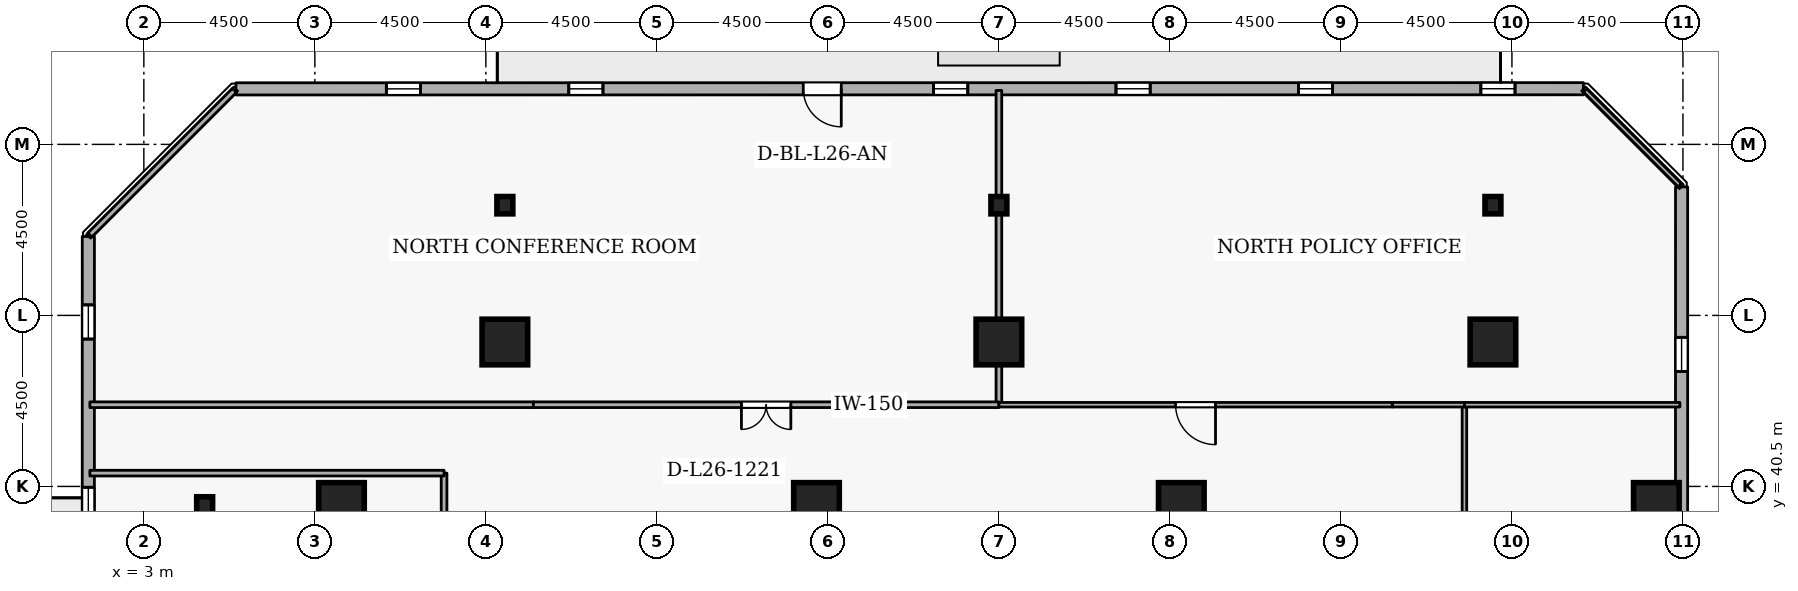
"""IFC4 building model, lengths in metres.
Left out: names, types, materials, properties, quantities, classifications, styles, units other than length and angle.
Written with IfcOpenShell. Run it as: python <this file> out.ifc"""

import sys

from ifc_helpers import new_model, si_unit, direction, frame, frame_2d, origin, origin_2d, place, context, subcontext, project, spatial, rectangle, i_section, extrude, element, fill, save


model = new_model("IFC4")
c1 = context("Model", 3, precision=1e-05, world=origin(), true_north=direction((0.0, 1.0)))
c2 = subcontext(c1, "Body", "Model", "MODEL_VIEW")
j1 = project(units=[si_unit("LENGTHUNIT", "METRE"), si_unit("PLANEANGLEUNIT", "RADIAN")], contexts=[c1])
p1 = place(None, origin())
s1 = spatial("IfcSite", under=j1, at=p1, CompositionType="ELEMENT")
p2 = place(p1, origin())
s2 = spatial("IfcBuilding", under=s1, at=p2, CompositionType="ELEMENT")
p3 = place(p2, frame((0.0, 0.0, 101.7)))
s3 = spatial("IfcBuildingStorey", under=s2, at=p3, CompositionType="ELEMENT", Elevation=101.7)
for number, where, z_axis, x_axis in (
    (1, (42.8, 40.0, 0.0), (0.0, 0.0, 1.0), (1.0, 0.0, 0.0)),
    (2, (12.5, 44.3, 0.0), (0.0, 0.0, 1.0), (1.0, 0.0, 0.0)),
    (3, (25.5, 44.3, 0.0), (0.0, 0.0, 1.0), (1.0, 0.0, 0.0)),
    (4, (38.5, 44.3, 0.0), (0.0, 0.0, 1.0), (1.0, 0.0, 0.0)),
    (5, (8.2, 40.0, 0.0), (0.0, 0.0, 1.0), (1.0, 0.0, 0.0)),
    (6, (20.7, 40.0, 0.0), (0.0, 0.0, 1.0), (1.0, 0.0, 0.0)),
    (7, (30.3, 40.0, 0.0), (0.0, 0.0, 1.0), (1.0, 0.0, 0.0)),
):
    element("IfcColumn", number, at=place(p3, frame(where, z_axis=z_axis, x_axis=x_axis)), inside=s3, PredefinedType="COLUMN", context=c2, shape_type="SweptSolid", body=[
        extrude(rectangle(XDim=1.2, YDim=1.2, at=origin_2d()), origin(), (0.0, 0.0, 1.0), 3.6),
    ])
for number, where, z_axis, x_axis in (
    (8, (12.5, 47.9, 0.0), (0.0, 0.0, 1.0), (1.0, 0.0, 0.0)),
    (9, (25.5, 47.9, 0.0), (0.0, 0.0, 1.0), (1.0, 0.0, 0.0)),
    (10, (38.5, 47.9, 0.0), (0.0, 0.0, 1.0), (1.0, 0.0, 0.0)),
    (11, (4.6, 40.0, 0.0), (0.0, 0.0, 1.0), (1.0, 0.0, 0.0)),
):
    element("IfcColumn", number, at=place(p3, frame(where, z_axis=z_axis, x_axis=x_axis)), inside=s3, PredefinedType="COLUMN", context=c2, shape_type="SweptSolid", body=[
        extrude(i_section(OverallWidth=0.418, OverallDepth=0.456, WebThickness=0.042, FlangeThickness=0.067, FilletRadius=0.015, at=origin_2d()), origin(), (0.0, 0.0, 1.0), 3.6),
    ])
p4 = place(p3, frame((43.46, 12.923, 0.0), z_axis=(0.0, 0.0, 1.0), x_axis=(0.00011704845, 0.99999999315, 0.0)))
e12 = element("IfcWall", 12, at=p4, inside=s3, PredefinedType="STANDARD", context=c2, shape_type="SweptSolid", body=[
    extrude(rectangle(XDim=35.459, YDim=0.32, at=frame_2d((17.729, 0.0))), origin(), (0.0, 0.0, 1.0), 2.7),
])
p5 = place(p4, frame((6.6, 0.0, 0.72)))
e13 = element("IfcOpeningElement", 13, at=p5, cuts=e12, PredefinedType="OPENING", context=c2, shape_type="SweptSolid", body=[
    extrude(rectangle(XDim=0.9, YDim=1.75, at=frame_2d((0.45, 0.875))), frame((0.0, 0.17, 0.0), z_axis=(0.0, -1.0, 0.0), x_axis=(1.0, 0.0, 0.0)), (0.0, 0.0, 1.0), 0.34),
])
p6 = place(p4, frame((11.4, 0.0, 0.72)))
e14 = element("IfcOpeningElement", 14, at=p6, cuts=e12, PredefinedType="OPENING", context=c2, shape_type="SweptSolid", body=[
    extrude(rectangle(XDim=0.9, YDim=1.75, at=frame_2d((0.45, 0.875))), frame((0.0, 0.17, 0.0), z_axis=(0.0, -1.0, 0.0), x_axis=(1.0, 0.0, 0.0)), (0.0, 0.0, 1.0), 0.34),
])
p7 = place(p4, frame((16.2, 0.0, 0.72)))
e15 = element("IfcOpeningElement", 15, at=p7, cuts=e12, PredefinedType="OPENING", context=c2, shape_type="SweptSolid", body=[
    extrude(rectangle(XDim=0.9, YDim=1.75, at=frame_2d((0.45, 0.875))), frame((0.0, 0.17, 0.0), z_axis=(0.0, -1.0, 0.0), x_axis=(1.0, 0.0, 0.0)), (0.0, 0.0, 1.0), 0.34),
])
p8 = place(p4, frame((21.0, 0.0, 0.72)))
e16 = element("IfcOpeningElement", 16, at=p8, cuts=e12, PredefinedType="OPENING", context=c2, shape_type="SweptSolid", body=[
    extrude(rectangle(XDim=0.9, YDim=1.75, at=frame_2d((0.45, 0.875))), frame((0.0, 0.17, 0.0), z_axis=(0.0, -1.0, 0.0), x_axis=(1.0, 0.0, 0.0)), (0.0, 0.0, 1.0), 0.34),
])
p9 = place(p4, frame((30.6, 0.0, 0.72)))
e17 = element("IfcOpeningElement", 17, at=p9, cuts=e12, PredefinedType="OPENING", context=c2, shape_type="SweptSolid", body=[
    extrude(rectangle(XDim=0.9, YDim=1.75, at=frame_2d((0.45, 0.875))), frame((0.0, 0.17, 0.0), z_axis=(0.0, -1.0, 0.0), x_axis=(1.0, 0.0, 0.0)), (0.0, 0.0, 1.0), 0.34),
])
p10 = place(p3, frame((40.881, 50.965, 0.0), z_axis=(0.0, 0.0, 1.0), x_axis=(-0.99999999315, -0.00011704845, 0.0)))
e18 = element("IfcWall", 18, at=p10, inside=s3, PredefinedType="STANDARD", context=c2, shape_type="SweptSolid", body=[
    extrude(rectangle(XDim=35.459, YDim=0.32, at=frame_2d((17.729, 0.0))), origin(), (0.0, 0.0, 1.0), 2.7),
])
p11 = place(p10, frame((19.529, 0.0, 0.0)))
e19 = element("IfcOpeningElement", 19, at=p11, cuts=e18, PredefinedType="OPENING", context=c2, shape_type="SweptSolid", body=[
    extrude(rectangle(XDim=1.0, YDim=2.08, at=frame_2d((0.5, 1.04))), frame((0.0, 0.17, 0.0), z_axis=(0.0, -1.0, 0.0), x_axis=(1.0, 0.0, 0.0)), (0.0, 0.0, 1.0), 0.34),
])
p12 = place(p10, frame((1.8, 0.0, 0.72)))
e20 = element("IfcOpeningElement", 20, at=p12, cuts=e18, PredefinedType="OPENING", context=c2, shape_type="SweptSolid", body=[
    extrude(rectangle(XDim=0.9, YDim=1.75, at=frame_2d((0.45, 0.875))), frame((0.0, 0.17, 0.0), z_axis=(0.0, -1.0, 0.0), x_axis=(1.0, 0.0, 0.0)), (0.0, 0.0, 1.0), 0.34),
])
p13 = place(p10, frame((6.6, 0.0, 0.72)))
e21 = element("IfcOpeningElement", 21, at=p13, cuts=e18, PredefinedType="OPENING", context=c2, shape_type="SweptSolid", body=[
    extrude(rectangle(XDim=0.9, YDim=1.75, at=frame_2d((0.45, 0.875))), frame((0.0, 0.17, 0.0), z_axis=(0.0, -1.0, 0.0), x_axis=(1.0, 0.0, 0.0)), (0.0, 0.0, 1.0), 0.34),
])
p14 = place(p10, frame((11.4, 0.0, 0.72)))
e22 = element("IfcOpeningElement", 22, at=p14, cuts=e18, PredefinedType="OPENING", context=c2, shape_type="SweptSolid", body=[
    extrude(rectangle(XDim=0.9, YDim=1.75, at=frame_2d((0.45, 0.875))), frame((0.0, 0.17, 0.0), z_axis=(0.0, -1.0, 0.0), x_axis=(1.0, 0.0, 0.0)), (0.0, 0.0, 1.0), 0.34),
])
p15 = place(p10, frame((16.2, 0.0, 0.72)))
e23 = element("IfcOpeningElement", 23, at=p15, cuts=e18, PredefinedType="OPENING", context=c2, shape_type="SweptSolid", body=[
    extrude(rectangle(XDim=0.9, YDim=1.75, at=frame_2d((0.45, 0.875))), frame((0.0, 0.17, 0.0), z_axis=(0.0, -1.0, 0.0), x_axis=(1.0, 0.0, 0.0)), (0.0, 0.0, 1.0), 0.34),
])
p16 = place(p10, frame((25.8, 0.0, 0.72)))
e24 = element("IfcOpeningElement", 24, at=p16, cuts=e18, PredefinedType="OPENING", context=c2, shape_type="SweptSolid", body=[
    extrude(rectangle(XDim=0.9, YDim=1.75, at=frame_2d((0.45, 0.875))), frame((0.0, 0.17, 0.0), z_axis=(0.0, -1.0, 0.0), x_axis=(1.0, 0.0, 0.0)), (0.0, 0.0, 1.0), 0.34),
])
p17 = place(p10, frame((30.6, 0.0, 0.72)))
e25 = element("IfcOpeningElement", 25, at=p17, cuts=e18, PredefinedType="OPENING", context=c2, shape_type="SweptSolid", body=[
    extrude(rectangle(XDim=0.9, YDim=1.75, at=frame_2d((0.45, 0.875))), frame((0.0, 0.17, 0.0), z_axis=(0.0, -1.0, 0.0), x_axis=(1.0, 0.0, 0.0)), (0.0, 0.0, 1.0), 0.34),
])
p18 = place(p3, frame((1.54, 47.077, 0.0), z_axis=(0.0, 0.0, 1.0), x_axis=(-0.00011704845, -0.99999999315, 0.0)))
e26 = element("IfcWall", 26, at=p18, inside=s3, PredefinedType="STANDARD", context=c2, shape_type="SweptSolid", body=[
    extrude(rectangle(XDim=35.459, YDim=0.32, at=frame_2d((17.729, 0.0))), origin(), (0.0, 0.0, 1.0), 2.7),
])
p19 = place(p18, frame((20.429, 0.0, 0.0)))
e27 = element("IfcOpeningElement", 27, at=p19, cuts=e26, PredefinedType="OPENING", context=c2, shape_type="SweptSolid", body=[
    extrude(rectangle(XDim=1.0, YDim=2.08, at=frame_2d((0.5, 1.04))), frame((0.0, 0.17, 0.0), z_axis=(0.0, -1.0, 0.0), x_axis=(1.0, 0.0, 0.0)), (0.0, 0.0, 1.0), 0.34),
])
p20 = place(p18, frame((1.8, 0.0, 0.72)))
e28 = element("IfcOpeningElement", 28, at=p20, cuts=e26, PredefinedType="OPENING", context=c2, shape_type="SweptSolid", body=[
    extrude(rectangle(XDim=0.9, YDim=1.75, at=frame_2d((0.45, 0.875))), frame((0.0, 0.17, 0.0), z_axis=(0.0, -1.0, 0.0), x_axis=(1.0, 0.0, 0.0)), (0.0, 0.0, 1.0), 0.34),
])
p21 = place(p18, frame((6.6, 0.0, 0.72)))
e29 = element("IfcOpeningElement", 29, at=p21, cuts=e26, PredefinedType="OPENING", context=c2, shape_type="SweptSolid", body=[
    extrude(rectangle(XDim=0.9, YDim=1.75, at=frame_2d((0.45, 0.875))), frame((0.0, 0.17, 0.0), z_axis=(0.0, -1.0, 0.0), x_axis=(1.0, 0.0, 0.0)), (0.0, 0.0, 1.0), 0.34),
])
p22 = place(p18, frame((11.4, 0.0, 0.72)))
e30 = element("IfcOpeningElement", 30, at=p22, cuts=e26, PredefinedType="OPENING", context=c2, shape_type="SweptSolid", body=[
    extrude(rectangle(XDim=0.9, YDim=1.75, at=frame_2d((0.45, 0.875))), frame((0.0, 0.17, 0.0), z_axis=(0.0, -1.0, 0.0), x_axis=(1.0, 0.0, 0.0)), (0.0, 0.0, 1.0), 0.34),
])
p23 = place(p18, frame((16.2, 0.0, 0.72)))
e31 = element("IfcOpeningElement", 31, at=p23, cuts=e26, PredefinedType="OPENING", context=c2, shape_type="SweptSolid", body=[
    extrude(rectangle(XDim=0.9, YDim=1.75, at=frame_2d((0.45, 0.875))), frame((0.0, 0.17, 0.0), z_axis=(0.0, -1.0, 0.0), x_axis=(1.0, 0.0, 0.0)), (0.0, 0.0, 1.0), 0.34),
])
p24 = place(p18, frame((25.8, 0.0, 0.72)))
e32 = element("IfcOpeningElement", 32, at=p24, cuts=e26, PredefinedType="OPENING", context=c2, shape_type="SweptSolid", body=[
    extrude(rectangle(XDim=0.9, YDim=1.75, at=frame_2d((0.45, 0.875))), frame((0.0, 0.17, 0.0), z_axis=(0.0, -1.0, 0.0), x_axis=(1.0, 0.0, 0.0)), (0.0, 0.0, 1.0), 0.34),
])
p25 = place(p18, frame((30.6, 0.0, 0.72)))
e33 = element("IfcOpeningElement", 33, at=p25, cuts=e26, PredefinedType="OPENING", context=c2, shape_type="SweptSolid", body=[
    extrude(rectangle(XDim=0.9, YDim=1.75, at=frame_2d((0.45, 0.875))), frame((0.0, 0.17, 0.0), z_axis=(0.0, -1.0, 0.0), x_axis=(1.0, 0.0, 0.0)), (0.0, 0.0, 1.0), 0.34),
])
p26 = place(p3, frame((10.9, 40.85, 0.0), z_axis=(0.0, 0.0, 1.0), x_axis=(0.0, -1.0, 0.0)))
e34 = element("IfcWall", 34, at=p26, inside=s3, PredefinedType="PARTITIONING", context=c2, shape_type="SweptSolid", body=[
    extrude(rectangle(XDim=4.912, YDim=0.15, at=frame_2d((2.456, 0.0))), origin(), (0.0, 0.0, 1.0), 3.34),
])
p27 = place(p3, frame((1.58, 40.85, 0.0), z_axis=(0.0, 0.0, 1.0), x_axis=(1.0, 0.0, 0.0)))
e35 = element("IfcWall", 35, at=p27, inside=s3, PredefinedType="PARTITIONING", context=c2, shape_type="SweptSolid", body=[
    extrude(rectangle(XDim=9.32, YDim=0.15, at=frame_2d((4.66, 0.0))), origin(), (0.0, 0.0, 1.0), 3.34),
])
p28 = place(p3, frame((37.75, 33.3, 0.0), z_axis=(0.0, 0.0, 1.0), x_axis=(0.0, 1.0, 0.0)))
e36 = element("IfcWall", 36, at=p28, inside=s3, PredefinedType="PARTITIONING", context=c2, shape_type="SweptSolid", body=[
    extrude(rectangle(XDim=9.35, YDim=0.12, at=frame_2d((4.675, 0.0))), origin(), (0.0, 0.0, 1.0), 3.34),
])
p29 = place(p28, frame((4.15, 0.0, 0.0)))
e37 = element("IfcOpeningElement", 37, at=p29, cuts=e36, PredefinedType="OPENING", context=c2, shape_type="SweptSolid", body=[
    extrude(rectangle(XDim=1.05, YDim=2.1, at=frame_2d((0.525, 1.05))), frame((0.0, 0.07, 0.0), z_axis=(0.0, -1.0, 0.0), x_axis=(1.0, 0.0, 0.0)), (0.0, 0.0, 1.0), 0.14),
])
p30 = place(p3, frame((37.75, 42.65, 0.0), z_axis=(0.0, 0.0, 1.0), x_axis=(1.0, 0.0, 0.0)))
e38 = element("IfcWall", 38, at=p30, inside=s3, PredefinedType="PARTITIONING", context=c2, shape_type="SweptSolid", body=[
    extrude(rectangle(XDim=5.67, YDim=0.12, at=frame_2d((2.835, 0.0))), origin(), (0.0, 0.0, 1.0), 3.34),
])
p31 = place(p3, frame((13.25, 42.65, 0.0), z_axis=(0.0, 0.0, 1.0), x_axis=(-1.0, 0.0, 0.0)))
e39 = element("IfcWall", 39, at=p31, inside=s3, PredefinedType="PARTITIONING", context=c2, shape_type="SweptSolid", body=[
    extrude(rectangle(XDim=11.67, YDim=0.15, at=frame_2d((5.835, 0.0))), origin(), (0.0, 0.0, 1.0), 3.34),
])
p32 = place(p3, frame((1.58, 47.116, 0.0), z_axis=(0.0, 0.0, 1.0), x_axis=(0.707106781187, 0.707106781187, 0.0)))
e40 = element("IfcWall", 40, at=p32, inside=s3, PredefinedType="PARTITIONING", context=c2, shape_type="SweptSolid", body=[
    extrude(rectangle(XDim=5.379, YDim=0.15, at=frame_2d((2.689, 0.0))), origin(), (0.0, 0.0, 1.0), 3.34),
])
p33 = place(p3, frame((25.5, 50.92, 0.0), z_axis=(0.0, 0.0, 1.0), x_axis=(0.0, -1.0, 0.0)))
e41 = element("IfcWall", 41, at=p33, inside=s3, PredefinedType="PARTITIONING", context=c2, shape_type="SweptSolid", body=[
    extrude(rectangle(XDim=8.27, YDim=0.15, at=frame_2d((4.135, 0.0))), origin(), (0.0, 0.0, 1.0), 2.878),
])
p34 = place(p3, frame((25.5, 42.65, 0.0), z_axis=(0.0, 0.0, 1.0), x_axis=(-1.0, 0.0, 0.0)))
e42 = element("IfcWall", 42, at=p34, inside=s3, PredefinedType="PARTITIONING", context=c2, shape_type="SweptSolid", body=[
    extrude(rectangle(XDim=12.25, YDim=0.15, at=frame_2d((6.125, 0.0))), origin(), (0.0, 0.0, 1.0), 3.34),
])
p35 = place(p34, frame((5.475, 0.0, 0.0)))
e43 = element("IfcOpeningElement", 43, at=p35, cuts=e42, PredefinedType="OPENING", context=c2, shape_type="SweptSolid", body=[
    extrude(rectangle(XDim=1.3, YDim=2.12, at=frame_2d((0.65, 1.06))), frame((0.0, 0.085, 0.0), z_axis=(0.0, -1.0, 0.0), x_axis=(1.0, 0.0, 0.0)), (0.0, 0.0, 1.0), 0.17),
])
p36 = place(p3, frame((37.75, 42.65, 0.0), z_axis=(0.0, 0.0, 1.0), x_axis=(-1.0, 0.0, 0.0)))
e44 = element("IfcWall", 44, at=p36, inside=s3, PredefinedType="PARTITIONING", context=c2, shape_type="SweptSolid", body=[
    extrude(rectangle(XDim=1.9, YDim=0.12, at=frame_2d((0.95, 0.0))), origin(), (0.0, 0.0, 1.0), 3.34),
])
p37 = place(p3, frame((35.85, 42.65, 0.0), z_axis=(0.0, 0.0, 1.0), x_axis=(-1.0, 0.0, 0.0)))
e45 = element("IfcWall", 45, at=p37, inside=s3, PredefinedType="PARTITIONING", context=c2, shape_type="SweptSolid", body=[
    extrude(rectangle(XDim=10.35, YDim=0.12, at=frame_2d((5.175, 0.0))), origin(), (0.0, 0.0, 1.0), 2.895),
])
p38 = place(p37, frame((4.65, 0.0, 0.0)))
e46 = element("IfcOpeningElement", 46, at=p38, cuts=e45, PredefinedType="OPENING", context=c2, shape_type="SweptSolid", body=[
    extrude(rectangle(XDim=1.05, YDim=2.1, at=frame_2d((0.525, 1.05))), frame((0.0, 0.07, 0.0), z_axis=(0.0, -1.0, 0.0), x_axis=(1.0, 0.0, 0.0)), (0.0, 0.0, 1.0), 0.14),
])
p39 = place(p3, frame((40.925, 50.92, 0.0), z_axis=(0.0, 0.0, 1.0), x_axis=(0.707106781187, -0.707106781187, 0.0)))
e47 = element("IfcWall", 47, at=p39, inside=s3, PredefinedType="PARTITIONING", context=c2, shape_type="SweptSolid", body=[
    extrude(rectangle(XDim=3.528, YDim=0.12, at=frame_2d((1.764, 0.0))), origin(), (0.0, 0.0, 1.0), 3.34),
])
p40 = place(p9, origin())
e48 = element("IfcWindow", 48, at=p40, inside=s3, PartitioningType="SINGLE_PANEL", PredefinedType="WINDOW", context=c2, shape_type="SweptSolid", body=[
    extrude(rectangle(XDim=0.9, YDim=1.75, at=frame_2d((0.45, 0.875))), frame((0.0, 0.03, 0.0), z_axis=(0.0, -1.0, 0.0), x_axis=(1.0, 0.0, 0.0)), (0.0, 0.0, 1.0), 0.06),
])
fill(e17, e48)
p41 = place(p11, origin())
e49 = element("IfcDoor", 49, at=p41, inside=s3, OperationType="SINGLE_SWING_LEFT", PredefinedType="DOOR", context=c2, shape_type="SweptSolid", body=[
    extrude(rectangle(XDim=1.0, YDim=2.08, at=frame_2d((0.5, 1.04))), frame((0.0, 0.025, 0.0), z_axis=(0.0, -1.0, 0.0), x_axis=(1.0, 0.0, 0.0)), (0.0, 0.0, 1.0), 0.05),
])
fill(e19, e49)
p42 = place(p12, origin())
e50 = element("IfcWindow", 50, at=p42, inside=s3, PartitioningType="SINGLE_PANEL", PredefinedType="WINDOW", context=c2, shape_type="SweptSolid", body=[
    extrude(rectangle(XDim=0.9, YDim=1.75, at=frame_2d((0.45, 0.875))), frame((0.0, 0.03, 0.0), z_axis=(0.0, -1.0, 0.0), x_axis=(1.0, 0.0, 0.0)), (0.0, 0.0, 1.0), 0.06),
])
fill(e20, e50)
p43 = place(p13, origin())
e51 = element("IfcWindow", 51, at=p43, inside=s3, PartitioningType="SINGLE_PANEL", PredefinedType="WINDOW", context=c2, shape_type="SweptSolid", body=[
    extrude(rectangle(XDim=0.9, YDim=1.75, at=frame_2d((0.45, 0.875))), frame((0.0, 0.03, 0.0), z_axis=(0.0, -1.0, 0.0), x_axis=(1.0, 0.0, 0.0)), (0.0, 0.0, 1.0), 0.06),
])
fill(e21, e51)
p44 = place(p14, origin())
e52 = element("IfcWindow", 52, at=p44, inside=s3, PartitioningType="SINGLE_PANEL", PredefinedType="WINDOW", context=c2, shape_type="SweptSolid", body=[
    extrude(rectangle(XDim=0.9, YDim=1.75, at=frame_2d((0.45, 0.875))), frame((0.0, 0.03, 0.0), z_axis=(0.0, -1.0, 0.0), x_axis=(1.0, 0.0, 0.0)), (0.0, 0.0, 1.0), 0.06),
])
fill(e22, e52)
p45 = place(p15, origin())
e53 = element("IfcWindow", 53, at=p45, inside=s3, PartitioningType="SINGLE_PANEL", PredefinedType="WINDOW", context=c2, shape_type="SweptSolid", body=[
    extrude(rectangle(XDim=0.9, YDim=1.75, at=frame_2d((0.45, 0.875))), frame((0.0, 0.03, 0.0), z_axis=(0.0, -1.0, 0.0), x_axis=(1.0, 0.0, 0.0)), (0.0, 0.0, 1.0), 0.06),
])
fill(e23, e53)
p46 = place(p16, origin())
e54 = element("IfcWindow", 54, at=p46, inside=s3, PartitioningType="SINGLE_PANEL", PredefinedType="WINDOW", context=c2, shape_type="SweptSolid", body=[
    extrude(rectangle(XDim=0.9, YDim=1.75, at=frame_2d((0.45, 0.875))), frame((0.0, 0.03, 0.0), z_axis=(0.0, -1.0, 0.0), x_axis=(1.0, 0.0, 0.0)), (0.0, 0.0, 1.0), 0.06),
])
fill(e24, e54)
p47 = place(p17, origin())
e55 = element("IfcWindow", 55, at=p47, inside=s3, PartitioningType="SINGLE_PANEL", PredefinedType="WINDOW", context=c2, shape_type="SweptSolid", body=[
    extrude(rectangle(XDim=0.9, YDim=1.75, at=frame_2d((0.45, 0.875))), frame((0.0, 0.03, 0.0), z_axis=(0.0, -1.0, 0.0), x_axis=(1.0, 0.0, 0.0)), (0.0, 0.0, 1.0), 0.06),
])
fill(e25, e55)
p48 = place(p20, origin())
e56 = element("IfcWindow", 56, at=p48, inside=s3, PartitioningType="SINGLE_PANEL", PredefinedType="WINDOW", context=c2, shape_type="SweptSolid", body=[
    extrude(rectangle(XDim=0.9, YDim=1.75, at=frame_2d((0.45, 0.875))), frame((0.0, 0.03, 0.0), z_axis=(0.0, -1.0, 0.0), x_axis=(1.0, 0.0, 0.0)), (0.0, 0.0, 1.0), 0.06),
])
fill(e28, e56)
p49 = place(p21, origin())
e57 = element("IfcWindow", 57, at=p49, inside=s3, PartitioningType="SINGLE_PANEL", PredefinedType="WINDOW", context=c2, shape_type="SweptSolid", body=[
    extrude(rectangle(XDim=0.9, YDim=1.75, at=frame_2d((0.45, 0.875))), frame((0.0, 0.03, 0.0), z_axis=(0.0, -1.0, 0.0), x_axis=(1.0, 0.0, 0.0)), (0.0, 0.0, 1.0), 0.06),
])
fill(e29, e57)
p50 = place(p35, origin())
e58 = element("IfcDoor", 58, at=p50, inside=s3, OperationType="DOUBLE_DOOR_SINGLE_SWING", PredefinedType="DOOR", context=c2, shape_type="SweptSolid", body=[
    extrude(rectangle(XDim=1.3, YDim=2.12, at=frame_2d((0.65, 1.06))), frame((0.0, 0.025, 0.0), z_axis=(0.0, -1.0, 0.0), x_axis=(1.0, 0.0, 0.0)), (0.0, 0.0, 1.0), 0.05),
])
fill(e43, e58)
p51 = place(p38, origin())
e59 = element("IfcDoor", 59, at=p51, inside=s3, OperationType="SINGLE_SWING_LEFT", PredefinedType="DOOR", context=c2, shape_type="SweptSolid", body=[
    extrude(rectangle(XDim=1.05, YDim=2.1, at=frame_2d((0.525, 1.05))), frame((0.0, 0.025, 0.0), z_axis=(0.0, -1.0, 0.0), x_axis=(1.0, 0.0, 0.0)), (0.0, 0.0, 1.0), 0.05),
])
fill(e46, e59)
save(model, sys.argv[1])
